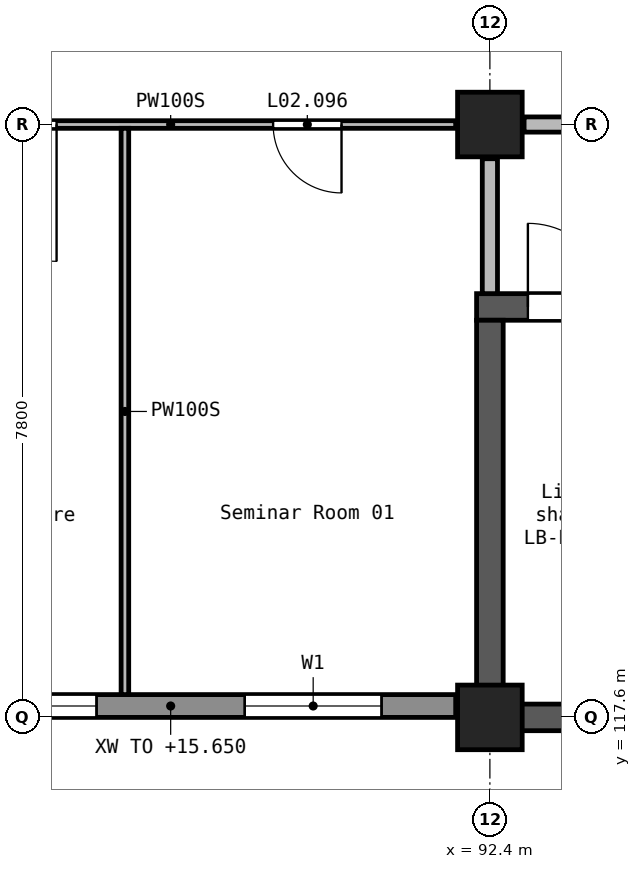
"""IFC4 building model, lengths in metres.
Left out: names, types, materials, properties, quantities, classifications, styles, units other than length and angle.
Written with IfcOpenShell. Run it as: python <this file> out.ifc"""

import sys

from ifc_helpers import new_model, si_unit, direction, frame, frame_2d, origin, origin_2d, place, context, subcontext, project, spatial, rectangle, extrude, element, fill, save


model = new_model("IFC4")
c1 = context("Model", 3, precision=1e-05, world=origin(), true_north=direction((0.0, 1.0)))
c2 = subcontext(c1, "Body", "Model", "MODEL_VIEW")
j1 = project(units=[si_unit("LENGTHUNIT", "METRE"), si_unit("PLANEANGLEUNIT", "RADIAN")], contexts=[c1])
p1 = place(None, origin())
s1 = spatial("IfcSite", under=j1, at=p1, CompositionType="ELEMENT")
p2 = place(p1, origin())
s2 = spatial("IfcBuilding", under=s1, at=p2, CompositionType="ELEMENT")
p3 = place(p2, frame((0.0, 0.0, 12.6)))
s3 = spatial("IfcBuildingStorey", under=s2, at=p3, CompositionType="ELEMENT", Elevation=12.6)
for number, where, z_axis, x_axis in (
    (1, (92.4, 117.6, 0.0), (0.0, 0.0, 1.0), (1.0, 0.0, 0.0)),
    (2, (92.4, 125.4, 0.0), (0.0, 0.0, 1.0), (1.0, 0.0, 0.0)),
):
    element("IfcColumn", number, at=place(p3, frame(where, z_axis=z_axis, x_axis=x_axis)), inside=s3, PredefinedType="COLUMN", context=c2, shape_type="SweptSolid", body=[
        extrude(rectangle(XDim=0.85, YDim=0.85, at=origin_2d()), origin(), (0.0, 0.0, 1.0), 4.2),
    ])
p4 = place(p3, frame((92.225, 123.0, 0.0), z_axis=(0.0, 0.0, 1.0), x_axis=(1.0, 0.0, 0.0)))
e3 = element("IfcWall", 3, at=p4, inside=s3, PredefinedType="SHEAR", context=c2, shape_type="SweptSolid", body=[
    extrude(rectangle(XDim=2.275, YDim=0.35, at=frame_2d((1.137, 0.0))), origin(), (0.0, 0.0, 1.0), 4.2),
])
p5 = place(p4, frame((0.675, 0.0, 0.0)))
e4 = element("IfcOpeningElement", 4, at=p5, cuts=e3, PredefinedType="OPENING", context=c2, shape_type="SweptSolid", body=[
    extrude(rectangle(XDim=1.1, YDim=2.1, at=frame_2d((0.55, 1.05))), frame((0.0, 0.185, 0.0), z_axis=(0.0, -1.0, 0.0), x_axis=(1.0, 0.0, 0.0)), (0.0, 0.0, 1.0), 0.37),
])
p6 = place(p3, frame((92.4, 117.425, 0.0), z_axis=(0.0, 0.0, 1.0), x_axis=(0.0, 1.0, 0.0)))
e5 = element("IfcWall", 5, at=p6, inside=s3, PredefinedType="SHEAR", context=c2, shape_type="SweptSolid", body=[
    extrude(rectangle(XDim=5.4, YDim=0.35, at=frame_2d((2.7, 0.0))), origin(), (0.0, 0.0, 1.0), 4.2),
])
p7 = place(p3, frame((92.575, 117.6, 0.0), z_axis=(0.0, 0.0, 1.0), x_axis=(1.0, 0.0, 0.0)))
e6 = element("IfcWall", 6, at=p7, inside=s3, PredefinedType="SHEAR", context=c2, shape_type="SweptSolid", body=[
    extrude(rectangle(XDim=1.925, YDim=0.35, at=frame_2d((0.962, 0.0))), origin(), (0.0, 0.0, 1.0), 4.2),
])
p8 = place(p3, frame((84.45, 117.75, 0.0), z_axis=(0.0, 0.0, 1.0), x_axis=(1.0, 0.0, 0.0)))
e7 = element("IfcWall", 7, at=p8, inside=s3, PredefinedType="STANDARD", context=c2, shape_type="SweptSolid", body=[
    extrude(rectangle(XDim=7.5, YDim=0.3, at=frame_2d((3.75, 0.0))), origin(), (0.0, 0.0, 1.0), 3.05),
])
p9 = place(p8, frame((0.975, 0.0, 0.9)))
e8 = element("IfcOpeningElement", 8, at=p9, cuts=e7, PredefinedType="OPENING", context=c2, shape_type="SweptSolid", body=[
    extrude(rectangle(XDim=1.8, YDim=1.5, at=frame_2d((0.9, 0.75))), frame((0.0, 0.16, 0.0), z_axis=(0.0, -1.0, 0.0), x_axis=(1.0, 0.0, 0.0)), (0.0, 0.0, 1.0), 0.32),
])
p10 = place(p8, frame((4.725, 0.0, 0.9)))
e9 = element("IfcOpeningElement", 9, at=p10, cuts=e7, PredefinedType="OPENING", context=c2, shape_type="SweptSolid", body=[
    extrude(rectangle(XDim=1.8, YDim=1.5, at=frame_2d((0.9, 0.75))), frame((0.0, 0.16, 0.0), z_axis=(0.0, -1.0, 0.0), x_axis=(1.0, 0.0, 0.0)), (0.0, 0.0, 1.0), 0.32),
])
p11 = place(p3, frame((92.85, 125.4, 0.0), z_axis=(0.0, 0.0, 1.0), x_axis=(1.0, 0.0, 0.0)))
e10 = element("IfcWall", 10, at=p11, inside=s3, PredefinedType="SOLIDWALL", context=c2, shape_type="SweptSolid", body=[
    extrude(rectangle(XDim=7.5, YDim=0.2, at=frame_2d((3.75, 0.0))), origin(), (0.0, 0.0, 1.0), 3.85),
])
p12 = place(p11, frame((2.85, 0.0, 0.0)))
e11 = element("IfcOpeningElement", 11, at=p12, cuts=e10, PredefinedType="OPENING", context=c2, shape_type="SweptSolid", body=[
    extrude(rectangle(XDim=1.8, YDim=2.1, at=frame_2d((0.9, 1.05))), frame((0.0, 0.11, 0.0), z_axis=(0.0, -1.0, 0.0), x_axis=(1.0, 0.0, 0.0)), (0.0, 0.0, 1.0), 0.22),
])
p13 = place(p3, frame((92.4, 123.175, 0.0), z_axis=(0.0, 0.0, 1.0), x_axis=(0.0, 1.0, 0.0)))
e12 = element("IfcWall", 12, at=p13, inside=s3, PredefinedType="SOLIDWALL", context=c2, shape_type="SweptSolid", body=[
    extrude(rectangle(XDim=1.775, YDim=0.2, at=frame_2d((0.887, 0.0))), origin(), (0.0, 0.0, 1.0), 3.85),
])
p14 = place(p3, frame((91.95, 125.4, 0.0), z_axis=(0.0, 0.0, 1.0), x_axis=(-1.0, 0.0, 0.0)))
e13 = element("IfcWall", 13, at=p14, inside=s3, PredefinedType="PARTITIONING", context=c2, shape_type="SweptSolid", body=[
    extrude(rectangle(XDim=7.5, YDim=0.1, at=frame_2d((3.75, 0.0))), origin(), (0.0, 0.0, 1.0), 3.85),
])
p15 = place(p14, frame((5.251, 0.0, 0.0)))
e14 = element("IfcOpeningElement", 14, at=p15, cuts=e13, PredefinedType="OPENING", context=c2, shape_type="SweptSolid", body=[
    extrude(rectangle(XDim=1.8, YDim=2.1, at=frame_2d((0.9, 1.05))), frame((0.0, 0.06, 0.0), z_axis=(0.0, -1.0, 0.0), x_axis=(1.0, 0.0, 0.0)), (0.0, 0.0, 1.0), 0.12),
])
p16 = place(p14, frame((1.502, 0.0, 0.0)))
e15 = element("IfcOpeningElement", 15, at=p16, cuts=e13, PredefinedType="OPENING", context=c2, shape_type="SweptSolid", body=[
    extrude(rectangle(XDim=0.9, YDim=2.1, at=frame_2d((0.45, 1.05))), frame((0.0, 0.06, 0.0), z_axis=(0.0, -1.0, 0.0), x_axis=(1.0, 0.0, 0.0)), (0.0, 0.0, 1.0), 0.12),
])
p17 = place(p3, frame((87.598, 117.9, 0.0), z_axis=(0.0, 0.0, 1.0), x_axis=(0.0, 1.0, 0.0)))
e16 = element("IfcWall", 16, at=p17, inside=s3, PredefinedType="PARTITIONING", context=c2, shape_type="SweptSolid", body=[
    extrude(rectangle(XDim=7.45, YDim=0.1, at=frame_2d((3.725, 0.0))), origin(), (0.0, 0.0, 1.0), 3.85),
])
p18 = place(p9, origin())
e17 = element("IfcWindow", 17, at=p18, inside=s3, PartitioningType="SINGLE_PANEL", PredefinedType="WINDOW", context=c2, shape_type="SweptSolid", body=[
    extrude(rectangle(XDim=1.8, YDim=1.5, at=frame_2d((0.9, 0.75))), frame((0.0, 0.03, 0.0), z_axis=(0.0, -1.0, 0.0), x_axis=(1.0, 0.0, 0.0)), (0.0, 0.0, 1.0), 0.06),
])
fill(e8, e17)
p19 = place(p10, origin())
e18 = element("IfcWindow", 18, at=p19, inside=s3, PartitioningType="SINGLE_PANEL", PredefinedType="WINDOW", context=c2, shape_type="SweptSolid", body=[
    extrude(rectangle(XDim=1.8, YDim=1.5, at=frame_2d((0.9, 0.75))), frame((0.0, 0.03, 0.0), z_axis=(0.0, -1.0, 0.0), x_axis=(1.0, 0.0, 0.0)), (0.0, 0.0, 1.0), 0.06),
])
fill(e9, e18)
p20 = place(p5, origin())
e19 = element("IfcDoor", 19, at=p20, inside=s3, OperationType="DOUBLE_DOOR_SLIDING", PredefinedType="DOOR", context=c2, shape_type="SweptSolid", body=[
    extrude(rectangle(XDim=1.1, YDim=2.1, at=frame_2d((0.55, 1.05))), frame((0.0, 0.025, 0.0), z_axis=(0.0, -1.0, 0.0), x_axis=(1.0, 0.0, 0.0)), (0.0, 0.0, 1.0), 0.05),
])
fill(e4, e19)
p21 = place(p15, origin())
e20 = element("IfcDoor", 20, at=p21, inside=s3, OperationType="DOUBLE_DOOR_SINGLE_SWING", PredefinedType="DOOR", context=c2, shape_type="SweptSolid", body=[
    extrude(rectangle(XDim=1.8, YDim=2.1, at=frame_2d((0.9, 1.05))), frame((0.0, 0.025, 0.0), z_axis=(0.0, -1.0, 0.0), x_axis=(1.0, 0.0, 0.0)), (0.0, 0.0, 1.0), 0.05),
])
fill(e14, e20)
p22 = place(p16, origin())
e21 = element("IfcDoor", 21, at=p22, inside=s3, OperationType="SINGLE_SWING_LEFT", PredefinedType="DOOR", context=c2, shape_type="SweptSolid", body=[
    extrude(rectangle(XDim=0.9, YDim=2.1, at=frame_2d((0.45, 1.05))), frame((0.0, 0.025, 0.0), z_axis=(0.0, -1.0, 0.0), x_axis=(1.0, 0.0, 0.0)), (0.0, 0.0, 1.0), 0.05),
])
fill(e15, e21)
save(model, sys.argv[1])
